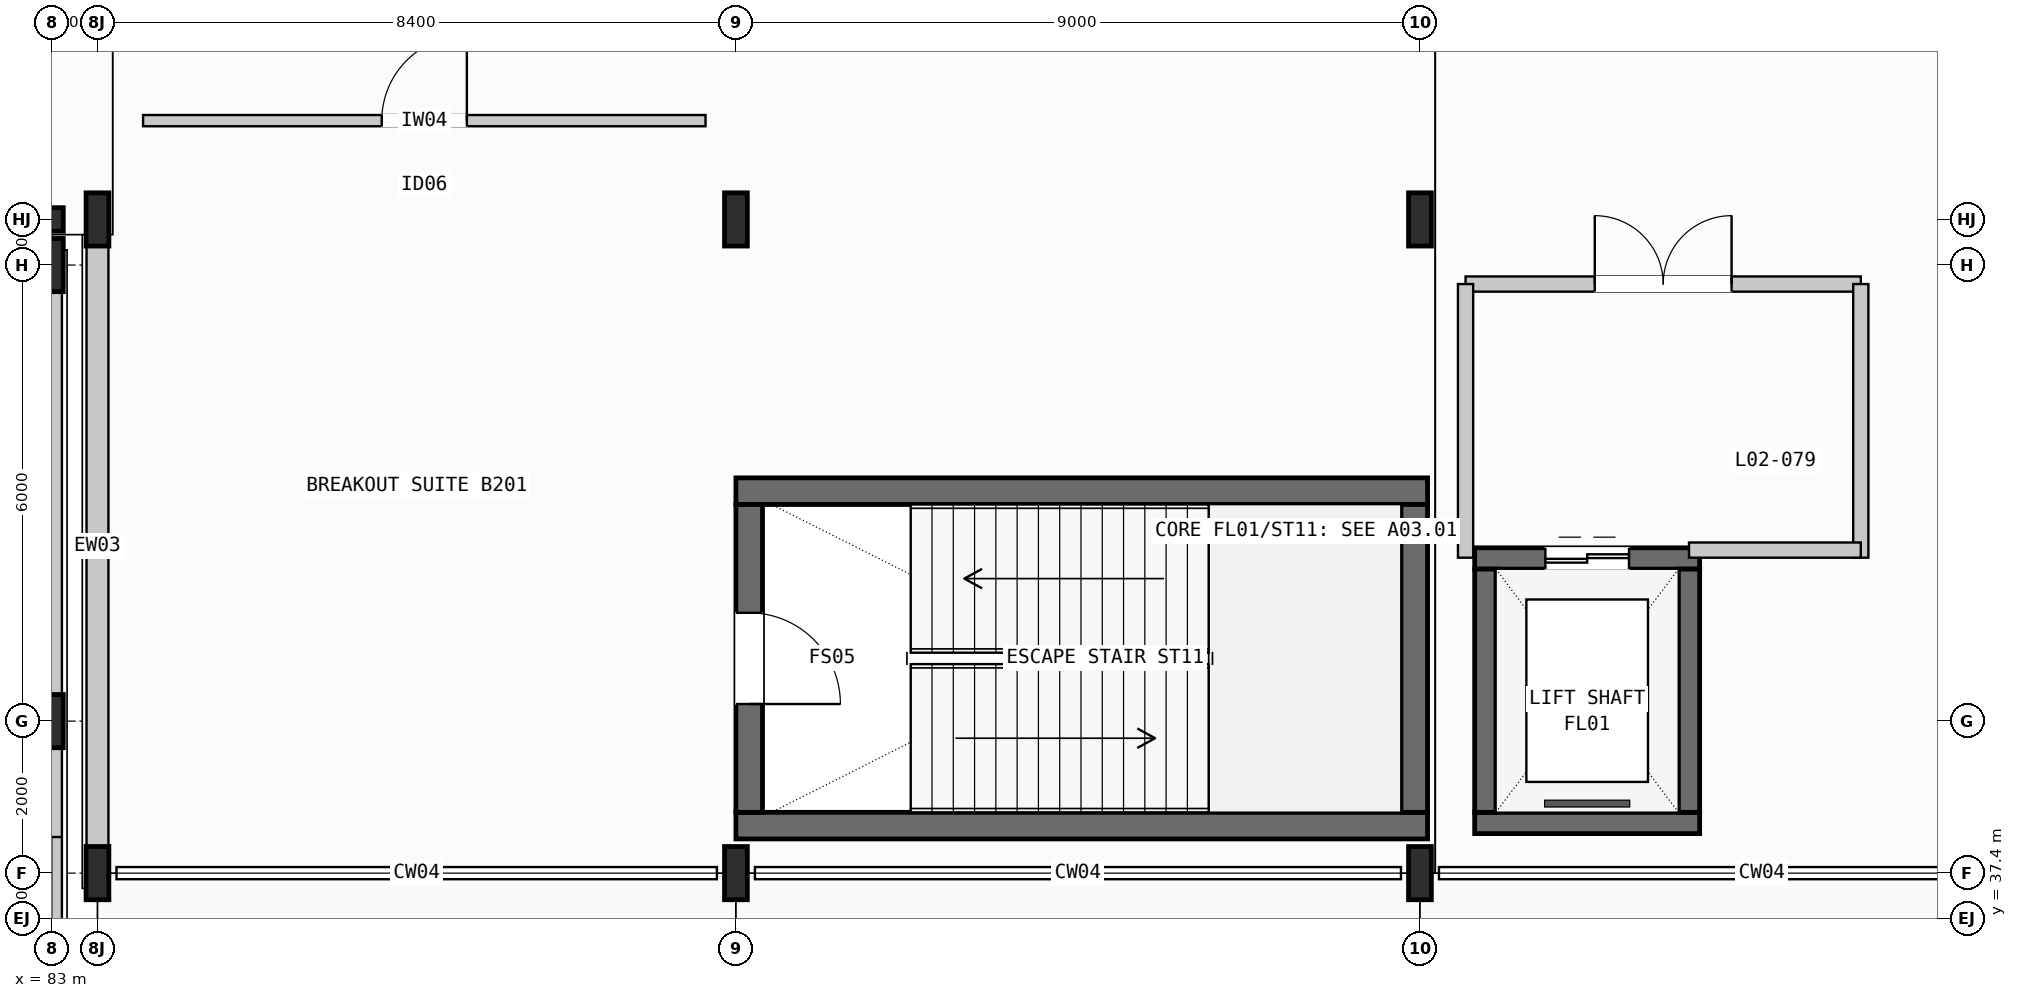
"""IFC4 building model, lengths in metres.
Left out: names, types, materials, properties, quantities, classifications, styles, units other than length and angle.
Written with IfcOpenShell. Run it as: python <this file> out.ifc"""

import sys

from ifc_helpers import new_model, si_unit, direction, frame, frame_2d, origin, origin_2d, place, context, subcontext, project, spatial, rectangle, i_section, extrude, element, fill, save


model = new_model("IFC4")
c1 = context("Model", 3, precision=1e-05, world=origin(), true_north=direction((0.0, 1.0)))
c2 = subcontext(c1, "Body", "Model", "MODEL_VIEW")
j1 = project(units=[si_unit("LENGTHUNIT", "METRE"), si_unit("PLANEANGLEUNIT", "RADIAN")], contexts=[c1])
p1 = place(None, origin())
s1 = spatial("IfcSite", under=j1, at=p1, CompositionType="ELEMENT")
p2 = place(p1, origin())
s2 = spatial("IfcBuilding", under=s1, at=p2, CompositionType="ELEMENT")
p3 = place(p2, frame((0.0, 0.0, 11.4)))
s3 = spatial("IfcBuildingStorey", under=s2, at=p3, CompositionType="ELEMENT", Elevation=11.4)
for number, where, z_axis, x_axis in (
    (1, (83.0, 40.0, 0.0), (0.0, 0.0, 1.0), (1.0, 0.0, 0.0)),
    (2, (83.0, 46.0, 0.0), (0.0, 0.0, 1.0), (1.0, 0.0, 0.0)),
):
    element("IfcColumn", number, at=place(p3, frame(where, z_axis=z_axis, x_axis=x_axis)), inside=s3, PredefinedType="COLUMN", context=c2, shape_type="SweptSolid", body=[
        extrude(i_section(OverallWidth=0.3, OverallDepth=0.7, WebThickness=0.017, FlangeThickness=0.032, FilletRadius=0.027, at=origin_2d()), origin(), (0.0, 0.0, 1.0), 5.4),
    ])
p4 = place(p3, frame((83.0, 46.6, 0.0), z_axis=(0.0, 0.0, 1.0), x_axis=(1.0, 0.0, 0.0)))
e3 = element("IfcColumn", 3, at=p4, inside=s3, PredefinedType="COLUMN", context=c2, shape_type="SweptSolid", body=[
    extrude(i_section(OverallWidth=0.3, OverallDepth=0.31, WebThickness=0.009, FlangeThickness=0.015, FilletRadius=0.027, at=origin_2d()), origin(), (0.0, 0.0, 1.0), 5.4),
])
for number, where, z_axis, x_axis in (
    (4, (83.6, 38.0, 0.0), (0.0, 0.0, 1.0), (1.0, 0.0, 0.0)),
    (5, (83.6, 46.6, 0.0), (0.0, 0.0, 1.0), (1.0, 0.0, 0.0)),
    (6, (92.0, 38.0, 0.0), (0.0, 0.0, 1.0), (1.0, 0.0, 0.0)),
    (7, (92.0, 46.6, 0.0), (0.0, 0.0, 1.0), (1.0, 0.0, 0.0)),
    (8, (101.0, 38.0, 0.0), (0.0, 0.0, 1.0), (1.0, 0.0, 0.0)),
    (9, (101.0, 46.6, 0.0), (0.0, 0.0, 1.0), (1.0, 0.0, 0.0)),
):
    element("IfcColumn", number, at=place(p3, frame(where, z_axis=z_axis, x_axis=x_axis)), inside=s3, PredefinedType="COLUMN", context=c2, shape_type="SweptSolid", body=[
        extrude(i_section(OverallWidth=0.3, OverallDepth=0.7, WebThickness=0.017, FlangeThickness=0.032, FilletRadius=0.027, at=origin_2d()), origin(), (0.0, 0.0, 1.0), 5.4),
    ])
for number, where, z_axis, x_axis in (
    (10, (92.0, 38.625, 0.0), (0.0, 0.0, 1.0), (1.0, 0.0, 0.0)),
    (11, (92.0, 43.025, 0.0), (0.0, 0.0, 1.0), (1.0, 0.0, 0.0)),
):
    element("IfcWall", number, at=place(p3, frame(where, z_axis=z_axis, x_axis=x_axis)), inside=s3, PredefinedType="SHEAR", context=c2, shape_type="SweptSolid", body=[
        extrude(rectangle(XDim=9.1, YDim=0.35, at=frame_2d((4.55, 0.0))), origin(), (0.0, 0.0, 1.0), 5.4),
    ])
p5 = place(p3, frame((92.175, 38.8, 0.0), z_axis=(0.0, 0.0, 1.0), x_axis=(0.0, 1.0, 0.0)))
e12 = element("IfcWall", 12, at=p5, inside=s3, PredefinedType="SHEAR", context=c2, shape_type="SweptSolid", body=[
    extrude(rectangle(XDim=4.05, YDim=0.35, at=frame_2d((2.025, 0.0))), origin(), (0.0, 0.0, 1.0), 5.4),
])
p6 = place(p5, frame((1.425, 0.0, 0.0)))
e13 = element("IfcOpeningElement", 13, at=p6, cuts=e12, PredefinedType="OPENING", context=c2, shape_type="SweptSolid", body=[
    extrude(rectangle(XDim=1.2, YDim=2.2, at=frame_2d((0.6, 1.1))), frame((0.0, 0.185, 0.0), z_axis=(0.0, -1.0, 0.0), x_axis=(1.0, 0.0, 0.0)), (0.0, 0.0, 1.0), 0.37),
])
p7 = place(p3, frame((100.925, 38.8, 0.0), z_axis=(0.0, 0.0, 1.0), x_axis=(0.0, 1.0, 0.0)))
e14 = element("IfcWall", 14, at=p7, inside=s3, PredefinedType="SHEAR", context=c2, shape_type="SweptSolid", body=[
    extrude(rectangle(XDim=4.05, YDim=0.35, at=frame_2d((2.025, 0.0))), origin(), (0.0, 0.0, 1.0), 5.4),
])
p8 = place(p3, frame((101.72, 38.66, 0.0), z_axis=(0.0, 0.0, 1.0), x_axis=(1.0, 0.0, 0.0)))
e15 = element("IfcWall", 15, at=p8, inside=s3, PredefinedType="SHEAR", context=c2, shape_type="SweptSolid", body=[
    extrude(rectangle(XDim=2.96, YDim=0.28, at=frame_2d((1.48, 0.0))), origin(), (0.0, 0.0, 1.0), 5.4),
])
p9 = place(p3, frame((101.72, 42.14, 0.0), z_axis=(0.0, 0.0, 1.0), x_axis=(1.0, 0.0, 0.0)))
e16 = element("IfcWall", 16, at=p9, inside=s3, PredefinedType="SHEAR", context=c2, shape_type="SweptSolid", body=[
    extrude(rectangle(XDim=2.96, YDim=0.28, at=frame_2d((1.48, 0.0))), origin(), (0.0, 0.0, 1.0), 5.4),
])
p10 = place(p9, frame((0.93, 0.0, 0.0)))
e17 = element("IfcOpeningElement", 17, at=p10, cuts=e16, PredefinedType="OPENING", context=c2, shape_type="SweptSolid", body=[
    extrude(rectangle(XDim=1.1, YDim=2.15, at=frame_2d((0.55, 1.075))), frame((0.0, 0.15, 0.0), z_axis=(0.0, -1.0, 0.0), x_axis=(1.0, 0.0, 0.0)), (0.0, 0.0, 1.0), 0.3),
])
for number, where, z_axis, x_axis in (
    (18, (101.86, 38.8, 0.0), (0.0, 0.0, 1.0), (0.0, 1.0, 0.0)),
    (19, (104.54, 38.8, 0.0), (0.0, 0.0, 1.0), (0.0, 1.0, 0.0)),
):
    element("IfcWall", number, at=place(p3, frame(where, z_axis=z_axis, x_axis=x_axis)), inside=s3, PredefinedType="SHEAR", context=c2, shape_type="SweptSolid", body=[
        extrude(rectangle(XDim=3.2, YDim=0.28, at=frame_2d((1.6, 0.0))), origin(), (0.0, 0.0, 1.0), 5.4),
    ])
p11 = place(p3, frame((83.0, 34.346, 0.0), z_axis=(0.0, 0.0, 1.0), x_axis=(0.0, 1.0, 0.0)))
e20 = element("IfcWall", 20, at=p11, inside=s3, PredefinedType="STANDARD", context=c2, shape_type="SweptSolid", body=[
    extrude(rectangle(XDim=5.308, YDim=0.264, at=frame_2d((2.654, 0.0))), origin(), (0.0, 0.0, 1.0), 4.538),
])
p12 = place(p11, frame((1.179, 0.0, 1.0)))
e21 = element("IfcOpeningElement", 21, at=p12, cuts=e20, PredefinedType="OPENING", context=c2, shape_type="SweptSolid", body=[
    extrude(rectangle(XDim=2.95, YDim=1.35, at=frame_2d((1.475, 0.675))), frame((0.0, 0.142, 0.0), z_axis=(0.0, -1.0, 0.0), x_axis=(1.0, 0.0, 0.0)), (0.0, 0.0, 1.0), 0.284),
])
p13 = place(p3, frame((83.0, 40.346, 0.0), z_axis=(0.0, 0.0, 1.0), x_axis=(0.0, 1.0, 0.0)))
e22 = element("IfcWall", 22, at=p13, inside=s3, PredefinedType="STANDARD", context=c2, shape_type="SweptSolid", body=[
    extrude(rectangle(XDim=5.308, YDim=0.264, at=frame_2d((2.654, 0.0))), origin(), (0.0, 0.0, 1.0), 4.538),
])
p14 = place(p3, frame((83.6, 38.346, 0.0), z_axis=(0.0, 0.0, 1.0), x_axis=(0.0, 1.0, 0.0)))
e23 = element("IfcWall", 23, at=p14, inside=s3, PredefinedType="STANDARD", context=c2, shape_type="SweptSolid", body=[
    extrude(rectangle(XDim=7.908, YDim=0.288, at=frame_2d((3.954, 0.0))), origin(), (0.0, 0.0, 1.0), 4.548),
])
p15 = place(p3, frame((101.6, 45.75, 0.0), z_axis=(0.0, 0.0, 1.0), x_axis=(1.0, 0.0, 0.0)))
e24 = element("IfcWall", 24, at=p15, inside=s3, PredefinedType="PARTITIONING", context=c2, shape_type="SweptSolid", body=[
    extrude(rectangle(XDim=5.2, YDim=0.2, at=frame_2d((2.6, 0.0))), origin(), (0.0, 0.0, 1.0), 4.0),
])
p16 = place(p15, frame((1.7, 0.0, 0.0)))
e25 = element("IfcOpeningElement", 25, at=p16, cuts=e24, PredefinedType="OPENING", context=c2, shape_type="SweptSolid", body=[
    extrude(rectangle(XDim=1.8, YDim=2.2, at=frame_2d((0.9, 1.1))), frame((0.0, 0.11, 0.0), z_axis=(0.0, -1.0, 0.0), x_axis=(1.0, 0.0, 0.0)), (0.0, 0.0, 1.0), 0.22),
])
for number, where, z_axis, x_axis in (
    (26, (101.6, 42.15, 0.0), (0.0, 0.0, 1.0), (0.0, 1.0, 0.0)),
    (27, (106.8, 42.15, 0.0), (0.0, 0.0, 1.0), (0.0, 1.0, 0.0)),
):
    element("IfcWall", number, at=place(p3, frame(where, z_axis=z_axis, x_axis=x_axis)), inside=s3, PredefinedType="PARTITIONING", context=c2, shape_type="SweptSolid", body=[
        extrude(rectangle(XDim=3.6, YDim=0.2, at=frame_2d((1.8, 0.0))), origin(), (0.0, 0.0, 1.0), 4.0),
    ])
p17 = place(p3, frame((104.54, 42.25, 0.0), z_axis=(0.0, 0.0, 1.0), x_axis=(1.0, 0.0, 0.0)))
e28 = element("IfcWall", 28, at=p17, inside=s3, PredefinedType="PARTITIONING", context=c2, shape_type="SweptSolid", body=[
    extrude(rectangle(XDim=2.26, YDim=0.2, at=frame_2d((1.13, 0.0))), origin(), (0.0, 0.0, 1.0), 4.0),
])
p18 = place(p3, frame((84.2, 47.9, 0.0), z_axis=(0.0, 0.0, 1.0), x_axis=(1.0, 0.0, 0.0)))
e29 = element("IfcWall", 29, at=p18, inside=s3, PredefinedType="PARTITIONING", context=c2, shape_type="SweptSolid", body=[
    extrude(rectangle(XDim=7.4, YDim=0.148, at=frame_2d((3.7, 0.0))), origin(), (0.0, 0.0, 1.0), 4.4),
])
p19 = place(p18, frame((3.14, 0.0, 0.0)))
e30 = element("IfcOpeningElement", 30, at=p19, cuts=e29, PredefinedType="OPENING", context=c2, shape_type="SweptSolid", body=[
    extrude(rectangle(XDim=1.12, YDim=2.22, at=frame_2d((0.56, 1.11))), frame((0.0, 0.084, 0.0), z_axis=(0.0, -1.0, 0.0), x_axis=(1.0, 0.0, 0.0)), (0.0, 0.0, 1.0), 0.168),
])
p20 = place(p12, origin())
e31 = element("IfcWindow", 31, at=p20, inside=s3, PartitioningType="SINGLE_PANEL", PredefinedType="WINDOW", context=c2, shape_type="SweptSolid", body=[
    extrude(rectangle(XDim=2.95, YDim=1.35, at=frame_2d((1.475, 0.675))), frame((0.0, 0.03, 0.0), z_axis=(0.0, -1.0, 0.0), x_axis=(1.0, 0.0, 0.0)), (0.0, 0.0, 1.0), 0.06),
])
fill(e21, e31)
p21 = place(p6, frame((1.2, 0.0, 0.0), z_axis=(0.0, 0.0, 1.0), x_axis=(-1.0, 0.0, 0.0)))
e32 = element("IfcDoor", 32, at=p21, inside=s3, OperationType="SINGLE_SWING_RIGHT", PredefinedType="DOOR", context=c2, shape_type="SweptSolid", body=[
    extrude(rectangle(XDim=1.2, YDim=2.2, at=frame_2d((0.6, 1.1))), frame((0.0, 0.025, 0.0), z_axis=(0.0, -1.0, 0.0), x_axis=(1.0, 0.0, 0.0)), (0.0, 0.0, 1.0), 0.05),
])
fill(e13, e32)
p22 = place(p10, origin())
e33 = element("IfcDoor", 33, at=p22, inside=s3, OperationType="DOUBLE_DOOR_SLIDING", PredefinedType="DOOR", context=c2, shape_type="SweptSolid", body=[
    extrude(rectangle(XDim=1.1, YDim=2.15, at=frame_2d((0.55, 1.075))), frame((0.0, 0.025, 0.0), z_axis=(0.0, -1.0, 0.0), x_axis=(1.0, 0.0, 0.0)), (0.0, 0.0, 1.0), 0.05),
])
fill(e17, e33)
p23 = place(p16, origin())
e34 = element("IfcDoor", 34, at=p23, inside=s3, OperationType="DOUBLE_DOOR_SINGLE_SWING", PredefinedType="DOOR", context=c2, shape_type="SweptSolid", body=[
    extrude(rectangle(XDim=1.8, YDim=2.2, at=frame_2d((0.9, 1.1))), frame((0.0, 0.025, 0.0), z_axis=(0.0, -1.0, 0.0), x_axis=(1.0, 0.0, 0.0)), (0.0, 0.0, 1.0), 0.05),
])
fill(e25, e34)
p24 = place(p19, origin())
e35 = element("IfcDoor", 35, at=p24, inside=s3, OperationType="SINGLE_SWING_RIGHT", PredefinedType="DOOR", context=c2, shape_type="SweptSolid", body=[
    extrude(rectangle(XDim=1.12, YDim=2.22, at=frame_2d((0.56, 1.11))), frame((0.0, 0.025, 0.0), z_axis=(0.0, -1.0, 0.0), x_axis=(1.0, 0.0, 0.0)), (0.0, 0.0, 1.0), 0.05),
])
fill(e30, e35)
save(model, sys.argv[1])
